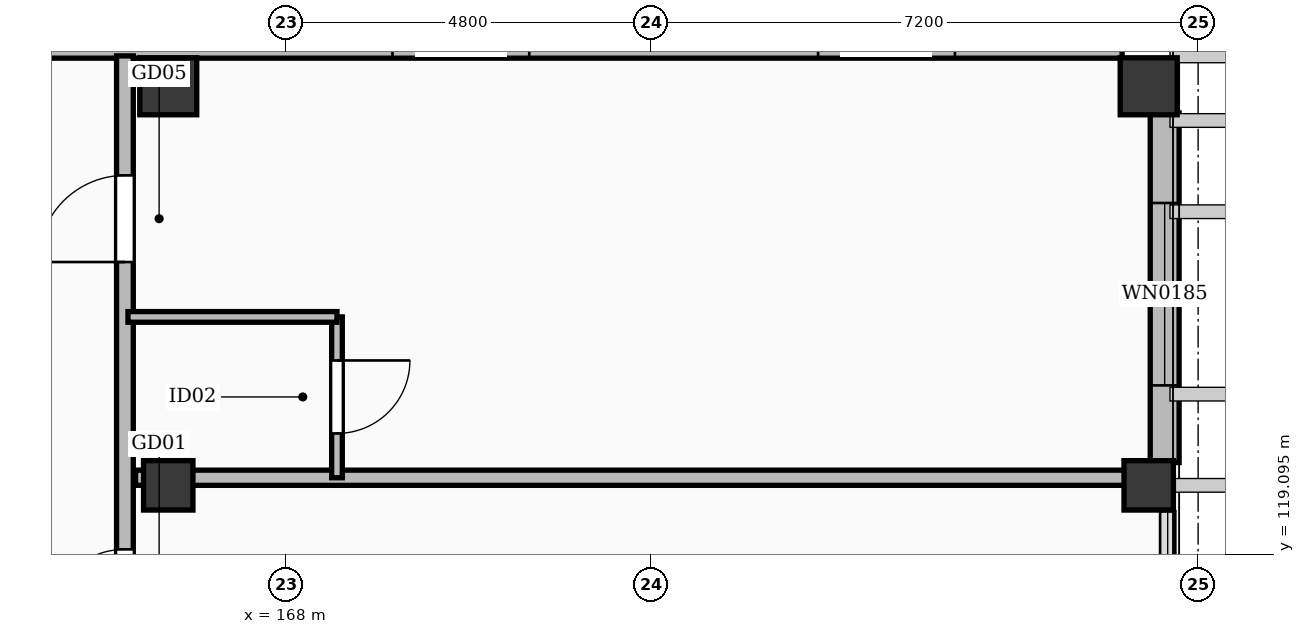
"""IFC4 building model, lengths in metres.
Left out: names, types, materials, properties, quantities, classifications, styles, units other than length and angle.
Written with IfcOpenShell. Run it as: python <this file> out.ifc"""

import sys

from ifc_helpers import new_model, si_unit, direction, frame, frame_2d, origin, origin_2d, place, context, subcontext, project, spatial, rectangle, extrude, element, fill, save


model = new_model("IFC4")
c1 = context("Model", 3, precision=1e-05, world=origin(), true_north=direction((0.0, 1.0)))
c2 = subcontext(c1, "Body", "Model", "MODEL_VIEW")
j1 = project(units=[si_unit("LENGTHUNIT", "METRE"), si_unit("PLANEANGLEUNIT", "RADIAN")], contexts=[c1])
p1 = place(None, origin())
s1 = spatial("IfcSite", under=j1, at=p1, CompositionType="ELEMENT")
p2 = place(p1, origin())
s2 = spatial("IfcBuilding", under=s1, at=p2, CompositionType="ELEMENT")
p3 = place(p2, frame((0.0, 0.0, 28.2)))
s3 = spatial("IfcBuildingStorey", under=s2, at=p3, CompositionType="ELEMENT", Elevation=28.2)
for number, where, z_axis, x_axis in (
    (1, (166.45, 125.25, 0.0), (0.0, 0.0, 1.0), (1.0, 0.0, 0.0)),
    (2, (179.35, 125.25, 0.0), (0.0, 0.0, 1.0), (1.0, 0.0, 0.0)),
):
    element("IfcColumn", number, at=place(p3, frame(where, z_axis=z_axis, x_axis=x_axis)), inside=s3, PredefinedType="COLUMN", context=c2, shape_type="SweptSolid", body=[
        extrude(rectangle(XDim=0.75, YDim=0.75, at=origin_2d()), origin(), (0.0, 0.0, 1.0), 3.6),
    ])
for number, where, z_axis, x_axis in (
    (3, (166.45, 120.0, 0.0), (0.0, 0.0, 1.0), (1.0, 0.0, 0.0)),
    (4, (179.35, 120.0, 0.0), (0.0, 0.0, 1.0), (1.0, 0.0, 0.0)),
):
    element("IfcColumn", number, at=place(p3, frame(where, z_axis=z_axis, x_axis=x_axis)), inside=s3, PredefinedType="COLUMN", context=c2, shape_type="SweptSolid", body=[
        extrude(rectangle(XDim=0.65, YDim=0.65, at=origin_2d()), origin(), (0.0, 0.0, 1.0), 3.6),
    ])
p4 = place(p3, frame((149.8, 125.81, 0.0), z_axis=(0.0, 0.0, 1.0), x_axis=(1.0, 0.0, 0.0)))
e5 = element("IfcWall", 5, at=p4, inside=s3, PredefinedType="SOLIDWALL", context=c2, shape_type="SweptSolid", body=[
    extrude(rectangle(XDim=29.2, YDim=0.38, at=frame_2d((14.6, 0.0))), origin(), (0.0, 0.0, 1.0), 3.34),
])
p5 = place(p4, frame((3.6, 0.0, 0.55)))
e6 = element("IfcOpeningElement", 6, at=p5, cuts=e5, PredefinedType="OPENING", context=c2, shape_type="SweptSolid", body=[
    extrude(rectangle(XDim=1.8, YDim=1.76, at=frame_2d((0.9, 0.88))), frame((0.0, 0.202, 0.0), z_axis=(0.0, -1.0, 0.0), x_axis=(1.0, 0.0, 0.0)), (0.0, 0.0, 1.0), 0.404),
])
p6 = place(p4, frame((9.2, 0.0, 0.55)))
e7 = element("IfcOpeningElement", 7, at=p6, cuts=e5, PredefinedType="OPENING", context=c2, shape_type="SweptSolid", body=[
    extrude(rectangle(XDim=1.8, YDim=1.76, at=frame_2d((0.9, 0.88))), frame((0.0, 0.202, 0.0), z_axis=(0.0, -1.0, 0.0), x_axis=(1.0, 0.0, 0.0)), (0.0, 0.0, 1.0), 0.404),
])
p7 = place(p4, frame((19.6, 0.0, 0.55)))
e8 = element("IfcOpeningElement", 8, at=p7, cuts=e5, PredefinedType="OPENING", context=c2, shape_type="SweptSolid", body=[
    extrude(rectangle(XDim=1.8, YDim=1.76, at=frame_2d((0.9, 0.88))), frame((0.0, 0.202, 0.0), z_axis=(0.0, -1.0, 0.0), x_axis=(1.0, 0.0, 0.0)), (0.0, 0.0, 1.0), 0.404),
])
p8 = place(p4, frame((25.2, 0.0, 0.55)))
e9 = element("IfcOpeningElement", 9, at=p8, cuts=e5, PredefinedType="OPENING", context=c2, shape_type="SweptSolid", body=[
    extrude(rectangle(XDim=1.8, YDim=1.76, at=frame_2d((0.9, 0.88))), frame((0.0, 0.202, 0.0), z_axis=(0.0, -1.0, 0.0), x_axis=(1.0, 0.0, 0.0)), (0.0, 0.0, 1.0), 0.404),
])
p9 = place(p3, frame((179.56, 124.9, 0.0), z_axis=(0.0, 0.0, 1.0), x_axis=(0.0, -1.0, 0.0)))
e10 = element("IfcWall", 10, at=p9, inside=s3, PredefinedType="SOLIDWALL", context=c2, shape_type="SweptSolid", body=[
    extrude(rectangle(XDim=4.6, YDim=0.38, at=frame_2d((2.3, 0.0))), origin(), (0.0, 0.0, 1.0), 2.582),
])
p10 = place(p9, frame((1.185, 0.0, 0.55)))
e11 = element("IfcOpeningElement", 11, at=p10, cuts=e10, PredefinedType="OPENING", context=c2, shape_type="SweptSolid", body=[
    extrude(rectangle(XDim=2.4, YDim=1.8, at=frame_2d((1.2, 0.9))), frame((0.0, 0.202, 0.0), z_axis=(0.0, -1.0, 0.0), x_axis=(1.0, 0.0, 0.0)), (0.0, 0.0, 1.0), 0.404),
])
p11 = place(p3, frame((165.88, 38.75, 0.0), z_axis=(0.0, 0.0, 1.0), x_axis=(0.0, 1.0, 0.0)))
e12 = element("IfcWall", 12, at=p11, inside=s3, PredefinedType="PARTITIONING", context=c2, shape_type="SweptSolid", body=[
    extrude(rectangle(XDim=86.9, YDim=0.22, at=frame_2d((43.45, 0.0))), origin(), (0.0, 0.0, 1.0), 2.582),
])
p12 = place(p11, frame((0.691, 0.0, 0.0)))
e13 = element("IfcOpeningElement", 13, at=p12, cuts=e12, PredefinedType="OPENING", context=c2, shape_type="SweptSolid", body=[
    extrude(rectangle(XDim=0.98, YDim=2.15, at=frame_2d((0.49, 1.075))), frame((0.0, 0.122, 0.0), z_axis=(0.0, -1.0, 0.0), x_axis=(1.0, 0.0, 0.0)), (0.0, 0.0, 1.0), 0.244),
])
p13 = place(p11, frame((7.038, 0.0, 0.0)))
e14 = element("IfcOpeningElement", 14, at=p13, cuts=e12, PredefinedType="OPENING", context=c2, shape_type="SweptSolid", body=[
    extrude(rectangle(XDim=1.28, YDim=2.16, at=frame_2d((0.64, 1.08))), frame((0.0, 0.122, 0.0), z_axis=(0.0, -1.0, 0.0), x_axis=(1.0, 0.0, 0.0)), (0.0, 0.0, 1.0), 0.244),
])
p14 = place(p11, frame((12.188, 0.0, 0.0)))
e15 = element("IfcOpeningElement", 15, at=p14, cuts=e12, PredefinedType="OPENING", context=c2, shape_type="SweptSolid", body=[
    extrude(rectangle(XDim=0.9, YDim=2.08, at=frame_2d((0.45, 1.04))), frame((0.0, 0.122, 0.0), z_axis=(0.0, -1.0, 0.0), x_axis=(1.0, 0.0, 0.0)), (0.0, 0.0, 1.0), 0.244),
])
p15 = place(p11, frame((16.988, 0.0, 0.0)))
e16 = element("IfcOpeningElement", 16, at=p15, cuts=e12, PredefinedType="OPENING", context=c2, shape_type="SweptSolid", body=[
    extrude(rectangle(XDim=1.05, YDim=2.22, at=frame_2d((0.525, 1.11))), frame((0.0, 0.122, 0.0), z_axis=(0.0, -1.0, 0.0), x_axis=(1.0, 0.0, 0.0)), (0.0, 0.0, 1.0), 0.244),
])
p16 = place(p11, frame((21.788, 0.0, 0.0)))
e17 = element("IfcOpeningElement", 17, at=p16, cuts=e12, PredefinedType="OPENING", context=c2, shape_type="SweptSolid", body=[
    extrude(rectangle(XDim=1.02, YDim=2.2, at=frame_2d((0.51, 1.1))), frame((0.0, 0.122, 0.0), z_axis=(0.0, -1.0, 0.0), x_axis=(1.0, 0.0, 0.0)), (0.0, 0.0, 1.0), 0.244),
])
p17 = place(p11, frame((26.588, 0.0, 0.0)))
e18 = element("IfcOpeningElement", 18, at=p17, cuts=e12, PredefinedType="OPENING", context=c2, shape_type="SweptSolid", body=[
    extrude(rectangle(XDim=1.14, YDim=2.26, at=frame_2d((0.57, 1.13))), frame((0.0, 0.122, 0.0), z_axis=(0.0, -1.0, 0.0), x_axis=(1.0, 0.0, 0.0)), (0.0, 0.0, 1.0), 0.244),
])
p18 = place(p11, frame((31.388, 0.0, 0.0)))
e19 = element("IfcOpeningElement", 19, at=p18, cuts=e12, PredefinedType="OPENING", context=c2, shape_type="SweptSolid", body=[
    extrude(rectangle(XDim=0.98, YDim=2.15, at=frame_2d((0.49, 1.075))), frame((0.0, 0.122, 0.0), z_axis=(0.0, -1.0, 0.0), x_axis=(1.0, 0.0, 0.0)), (0.0, 0.0, 1.0), 0.244),
])
p19 = place(p11, frame((35.838, 0.0, 0.0)))
e20 = element("IfcOpeningElement", 20, at=p19, cuts=e12, PredefinedType="OPENING", context=c2, shape_type="SweptSolid", body=[
    extrude(rectangle(XDim=1.28, YDim=2.16, at=frame_2d((0.64, 1.08))), frame((0.0, 0.122, 0.0), z_axis=(0.0, -1.0, 0.0), x_axis=(1.0, 0.0, 0.0)), (0.0, 0.0, 1.0), 0.244),
])
p20 = place(p11, frame((40.988, 0.0, 0.0)))
e21 = element("IfcOpeningElement", 21, at=p20, cuts=e12, PredefinedType="OPENING", context=c2, shape_type="SweptSolid", body=[
    extrude(rectangle(XDim=0.9, YDim=2.08, at=frame_2d((0.45, 1.04))), frame((0.0, 0.122, 0.0), z_axis=(0.0, -1.0, 0.0), x_axis=(1.0, 0.0, 0.0)), (0.0, 0.0, 1.0), 0.244),
])
p21 = place(p11, frame((45.788, 0.0, 0.0)))
e22 = element("IfcOpeningElement", 22, at=p21, cuts=e12, PredefinedType="OPENING", context=c2, shape_type="SweptSolid", body=[
    extrude(rectangle(XDim=1.05, YDim=2.22, at=frame_2d((0.525, 1.11))), frame((0.0, 0.122, 0.0), z_axis=(0.0, -1.0, 0.0), x_axis=(1.0, 0.0, 0.0)), (0.0, 0.0, 1.0), 0.244),
])
p22 = place(p11, frame((50.588, 0.0, 0.0)))
e23 = element("IfcOpeningElement", 23, at=p22, cuts=e12, PredefinedType="OPENING", context=c2, shape_type="SweptSolid", body=[
    extrude(rectangle(XDim=1.02, YDim=2.2, at=frame_2d((0.51, 1.1))), frame((0.0, 0.122, 0.0), z_axis=(0.0, -1.0, 0.0), x_axis=(1.0, 0.0, 0.0)), (0.0, 0.0, 1.0), 0.244),
])
p23 = place(p11, frame((55.388, 0.0, 0.0)))
e24 = element("IfcOpeningElement", 24, at=p23, cuts=e12, PredefinedType="OPENING", context=c2, shape_type="SweptSolid", body=[
    extrude(rectangle(XDim=1.14, YDim=2.26, at=frame_2d((0.57, 1.13))), frame((0.0, 0.122, 0.0), z_axis=(0.0, -1.0, 0.0), x_axis=(1.0, 0.0, 0.0)), (0.0, 0.0, 1.0), 0.244),
])
p24 = place(p11, frame((60.188, 0.0, 0.0)))
e25 = element("IfcOpeningElement", 25, at=p24, cuts=e12, PredefinedType="OPENING", context=c2, shape_type="SweptSolid", body=[
    extrude(rectangle(XDim=0.98, YDim=2.15, at=frame_2d((0.49, 1.075))), frame((0.0, 0.122, 0.0), z_axis=(0.0, -1.0, 0.0), x_axis=(1.0, 0.0, 0.0)), (0.0, 0.0, 1.0), 0.244),
])
p25 = place(p11, frame((64.638, 0.0, 0.0)))
e26 = element("IfcOpeningElement", 26, at=p25, cuts=e12, PredefinedType="OPENING", context=c2, shape_type="SweptSolid", body=[
    extrude(rectangle(XDim=1.28, YDim=2.16, at=frame_2d((0.64, 1.08))), frame((0.0, 0.122, 0.0), z_axis=(0.0, -1.0, 0.0), x_axis=(1.0, 0.0, 0.0)), (0.0, 0.0, 1.0), 0.244),
])
p26 = place(p11, frame((69.788, 0.0, 0.0)))
e27 = element("IfcOpeningElement", 27, at=p26, cuts=e12, PredefinedType="OPENING", context=c2, shape_type="SweptSolid", body=[
    extrude(rectangle(XDim=0.9, YDim=2.08, at=frame_2d((0.45, 1.04))), frame((0.0, 0.122, 0.0), z_axis=(0.0, -1.0, 0.0), x_axis=(1.0, 0.0, 0.0)), (0.0, 0.0, 1.0), 0.244),
])
p27 = place(p11, frame((74.588, 0.0, 0.0)))
e28 = element("IfcOpeningElement", 28, at=p27, cuts=e12, PredefinedType="OPENING", context=c2, shape_type="SweptSolid", body=[
    extrude(rectangle(XDim=1.05, YDim=2.22, at=frame_2d((0.525, 1.11))), frame((0.0, 0.122, 0.0), z_axis=(0.0, -1.0, 0.0), x_axis=(1.0, 0.0, 0.0)), (0.0, 0.0, 1.0), 0.244),
])
p28 = place(p11, frame((79.388, 0.0, 0.0)))
e29 = element("IfcOpeningElement", 29, at=p28, cuts=e12, PredefinedType="OPENING", context=c2, shape_type="SweptSolid", body=[
    extrude(rectangle(XDim=1.02, YDim=2.2, at=frame_2d((0.51, 1.1))), frame((0.0, 0.122, 0.0), z_axis=(0.0, -1.0, 0.0), x_axis=(1.0, 0.0, 0.0)), (0.0, 0.0, 1.0), 0.244),
])
p29 = place(p11, frame((84.188, 0.0, 0.0)))
e30 = element("IfcOpeningElement", 30, at=p29, cuts=e12, PredefinedType="OPENING", context=c2, shape_type="SweptSolid", body=[
    extrude(rectangle(XDim=1.14, YDim=2.26, at=frame_2d((0.57, 1.13))), frame((0.0, 0.122, 0.0), z_axis=(0.0, -1.0, 0.0), x_axis=(1.0, 0.0, 0.0)), (0.0, 0.0, 1.0), 0.244),
])
p30 = place(p3, frame((166.02, 120.1, 0.0), z_axis=(0.0, 0.0, 1.0), x_axis=(1.0, 0.0, 0.0)))
e31 = element("IfcWall", 31, at=p30, inside=s3, PredefinedType="PARTITIONING", context=c2, shape_type="SweptSolid", body=[
    extrude(rectangle(XDim=13.23, YDim=0.2, at=frame_2d((6.615, 0.0))), origin(), (0.0, 0.0, 1.0), 2.582),
])
p31 = place(p3, frame((168.67, 120.1, 0.0), z_axis=(0.0, 0.0, 1.0), x_axis=(0.0, 1.0, 0.0)))
e32 = element("IfcWall", 32, at=p31, inside=s3, PredefinedType="PARTITIONING", context=c2, shape_type="SweptSolid", body=[
    extrude(rectangle(XDim=2.116, YDim=0.14, at=frame_2d((1.058, 0.0))), origin(), (0.0, 0.0, 1.0), 2.682),
])
p32 = place(p31, frame((0.583, 0.0, 0.0)))
e33 = element("IfcOpeningElement", 33, at=p32, cuts=e32, PredefinedType="OPENING", context=c2, shape_type="SweptSolid", body=[
    extrude(rectangle(XDim=0.96, YDim=2.12, at=frame_2d((0.48, 1.06))), frame((0.0, 0.082, 0.0), z_axis=(0.0, -1.0, 0.0), x_axis=(1.0, 0.0, 0.0)), (0.0, 0.0, 1.0), 0.164),
])
p33 = place(p3, frame((165.92, 122.216, 0.0), z_axis=(0.0, 0.0, 1.0), x_axis=(1.0, 0.0, 0.0)))
e34 = element("IfcWall", 34, at=p33, inside=s3, PredefinedType="PARTITIONING", context=c2, shape_type="SweptSolid", body=[
    extrude(rectangle(XDim=2.75, YDim=0.14, at=frame_2d((1.375, 0.0))), origin(), (0.0, 0.0, 1.0), 2.682),
])
p34 = place(p10, origin())
e35 = element("IfcWindow", 35, at=p34, inside=s3, PartitioningType="SINGLE_PANEL", PredefinedType="WINDOW", context=c2, shape_type="SweptSolid", body=[
    extrude(rectangle(XDim=2.4, YDim=1.8, at=frame_2d((1.2, 0.9))), frame((0.0, 0.03, 0.0), z_axis=(0.0, -1.0, 0.0), x_axis=(1.0, 0.0, 0.0)), (0.0, 0.0, 1.0), 0.06),
])
fill(e11, e35)
p35 = place(p28, origin())
e36 = element("IfcDoor", 36, at=p35, inside=s3, OperationType="SINGLE_SWING_LEFT", PredefinedType="DOOR", context=c2, shape_type="SweptSolid", body=[
    extrude(rectangle(XDim=1.02, YDim=2.2, at=frame_2d((0.51, 1.1))), frame((0.0, 0.025, 0.0), z_axis=(0.0, -1.0, 0.0), x_axis=(1.0, 0.0, 0.0)), (0.0, 0.0, 1.0), 0.05),
])
fill(e29, e36)
p36 = place(p29, origin())
e37 = element("IfcDoor", 37, at=p36, inside=s3, OperationType="SINGLE_SWING_LEFT", PredefinedType="DOOR", context=c2, shape_type="SweptSolid", body=[
    extrude(rectangle(XDim=1.14, YDim=2.26, at=frame_2d((0.57, 1.13))), frame((0.0, 0.025, 0.0), z_axis=(0.0, -1.0, 0.0), x_axis=(1.0, 0.0, 0.0)), (0.0, 0.0, 1.0), 0.05),
])
fill(e30, e37)
p37 = place(p32, frame((0.96, 0.0, 0.0), z_axis=(0.0, 0.0, 1.0), x_axis=(-1.0, 0.0, 0.0)))
e38 = element("IfcDoor", 38, at=p37, inside=s3, OperationType="SINGLE_SWING_RIGHT", PredefinedType="DOOR", context=c2, shape_type="SweptSolid", body=[
    extrude(rectangle(XDim=0.96, YDim=2.12, at=frame_2d((0.48, 1.06))), frame((0.0, 0.025, 0.0), z_axis=(0.0, -1.0, 0.0), x_axis=(1.0, 0.0, 0.0)), (0.0, 0.0, 1.0), 0.05),
])
fill(e33, e38)
save(model, sys.argv[1])
